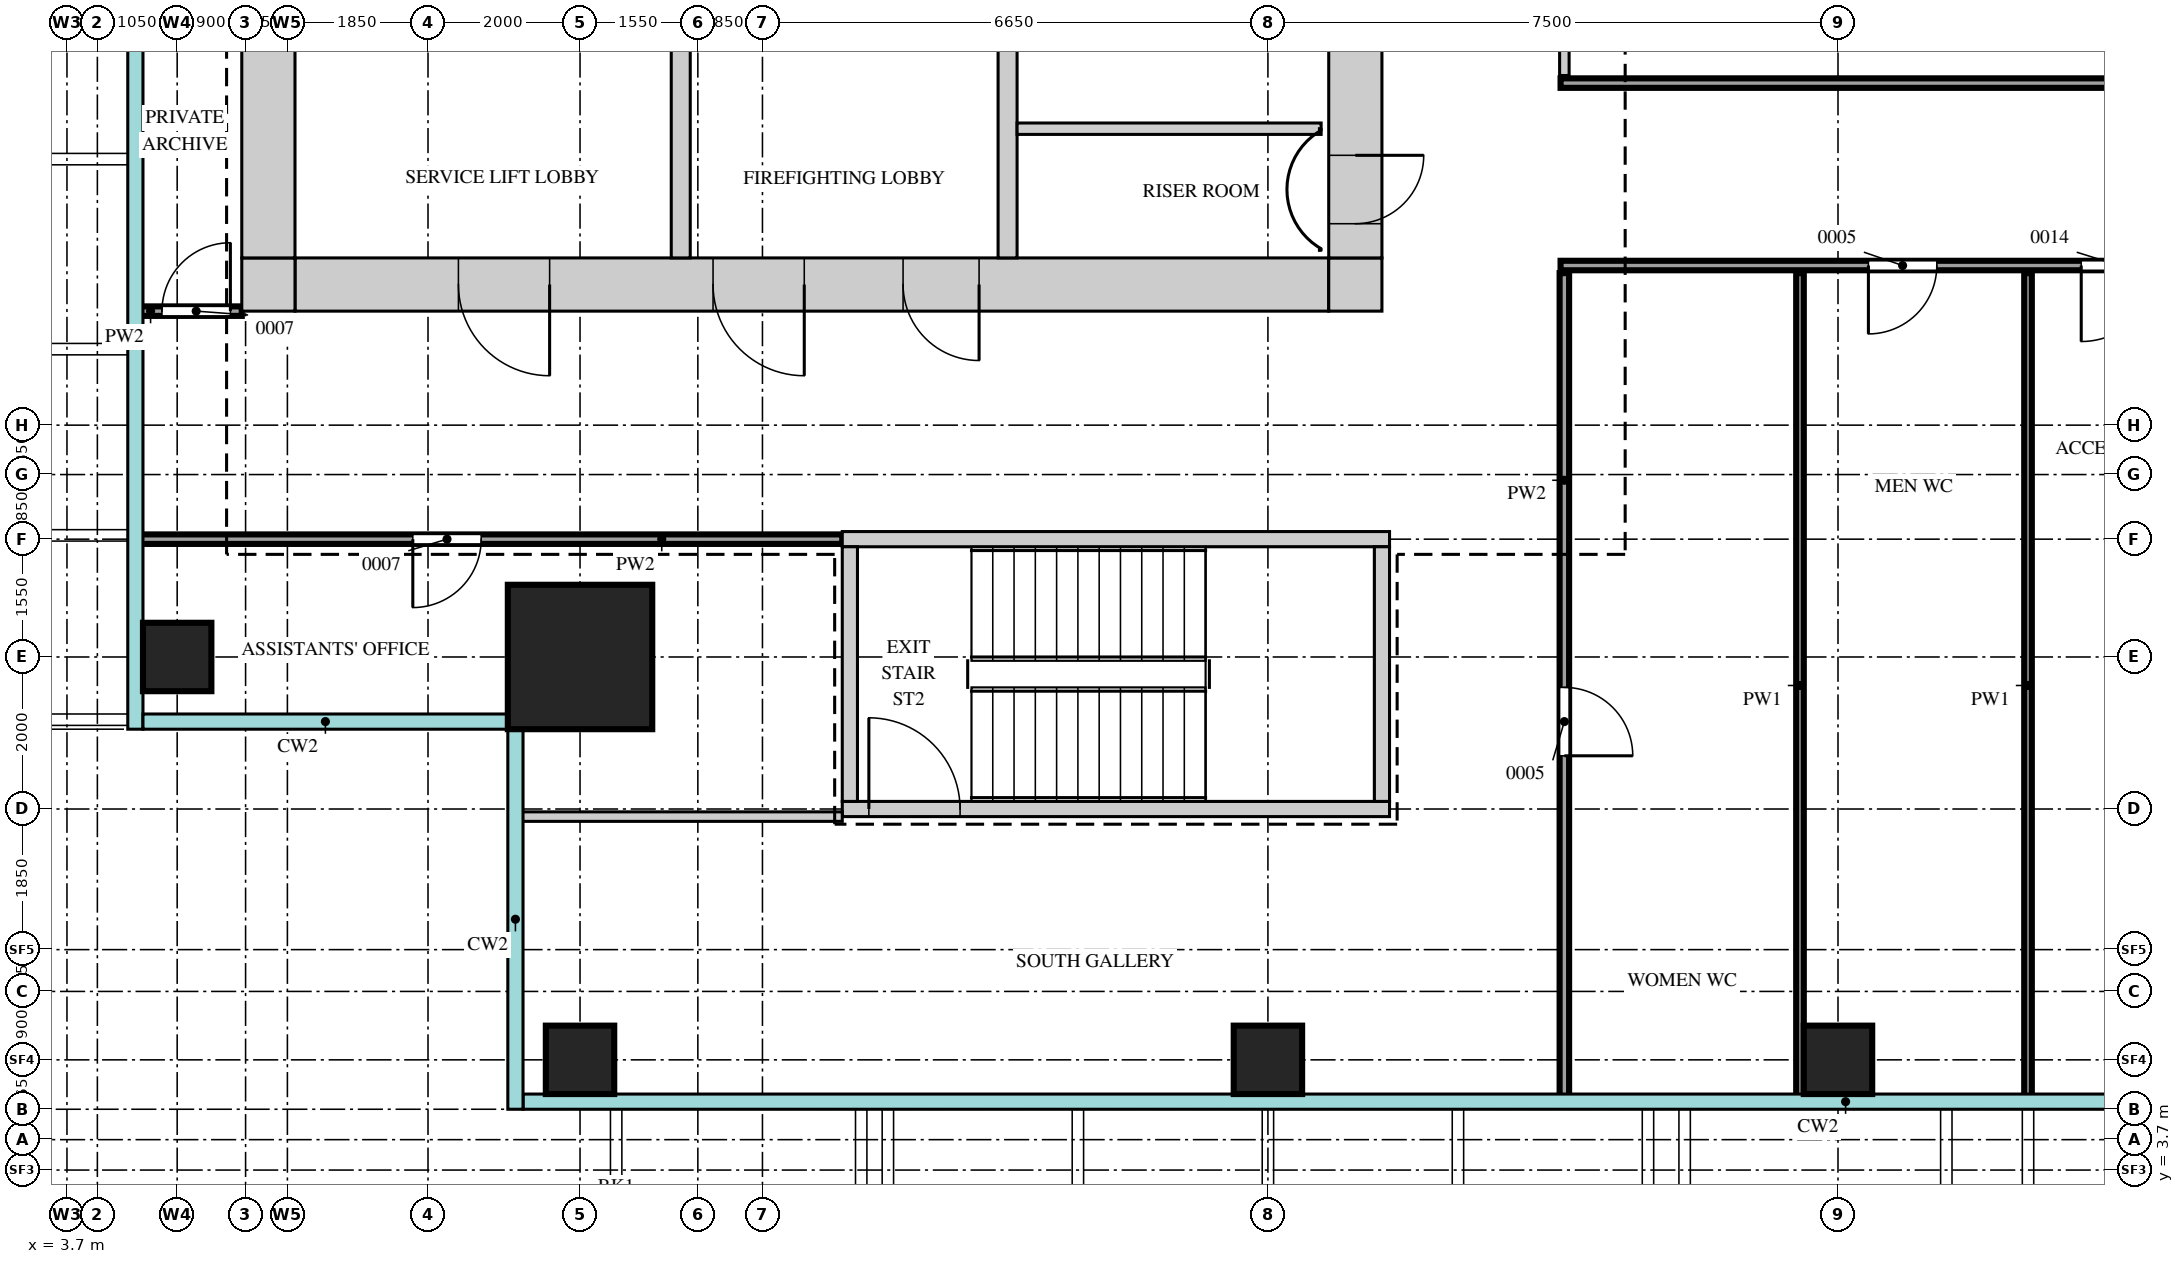
"""IFC4 building model, lengths in metres.
Left out: names, types, materials, properties, quantities, classifications, styles, units other than length and angle.
Written with IfcOpenShell. Run it as: python <this file> out.ifc"""

import sys

from ifc_helpers import new_model, si_unit, direction, frame, frame_2d, origin, origin_2d, place, context, subcontext, project, spatial, rectangle, extrude, source, transform, mapped, element, fill, save


model = new_model("IFC4")
c1 = context("Model", 3, precision=1e-05, world=origin(), true_north=direction((0.0, 1.0)))
c2 = subcontext(c1, "Body", "Model", "MODEL_VIEW")
j1 = project(units=[si_unit("LENGTHUNIT", "METRE"), si_unit("PLANEANGLEUNIT", "RADIAN")], contexts=[c1])
p1 = place(None, origin())
s1 = spatial("IfcSite", under=j1, at=p1, CompositionType="ELEMENT")
p2 = place(p1, origin())
s2 = spatial("IfcBuilding", under=s1, at=p2, CompositionType="ELEMENT")
p3 = place(p2, frame((0.0, 0.0, 266.2)))
s3 = spatial("IfcBuildingStorey", under=s2, at=p3, CompositionType="ELEMENT", Elevation=266.2)
m1 = source(origin(), c2, "Body", "SweptSolid", [
    extrude(rectangle(XDim=13.6, YDim=0.7, at=frame_2d((6.8, 0.0))), origin(), (0.0, 0.0, 1.0), 3.75),
])
p4 = place(p3, frame((6.7, 15.35, 0.0), z_axis=(0.0, 0.0, 1.0), x_axis=(1.0, 0.0, 0.0)))
e1 = element("IfcWall", 1, at=p4, inside=s3, PredefinedType="SHEAR", context=c2, shape_type="MappedRepresentation", body=[
    mapped(m1, transform((0.0, 0.0, 0.0))),
])
m2 = source(origin(), c2, "Body", "SweptSolid", [
    extrude(rectangle(XDim=1.2, YDim=2.1, at=frame_2d((0.6, 1.05))), frame((0.0, 0.36, 0.0), z_axis=(0.0, -1.0, 0.0), x_axis=(1.0, 0.0, 0.0)), (0.0, 0.0, 1.0), 0.72),
])
p5 = place(p4, frame((5.5, 0.0, 0.0)))
e2 = element("IfcOpeningElement", 2, at=p5, cuts=e1, PredefinedType="OPENING", context=c2, shape_type="MappedRepresentation", body=[
    mapped(m2, transform((0.0, 0.0, 0.0))),
])
p6 = place(p4, frame((2.15, 0.0, 0.0)))
e3 = element("IfcOpeningElement", 3, at=p6, cuts=e1, PredefinedType="OPENING", context=c2, shape_type="MappedRepresentation", body=[
    mapped(m2, transform((0.0, 0.0, 0.0))),
])
m3 = source(origin(), c2, "Body", "SweptSolid", [
    extrude(rectangle(XDim=1.0, YDim=2.1, at=frame_2d((0.5, 1.05))), frame((0.0, 0.36, 0.0), z_axis=(0.0, -1.0, 0.0), x_axis=(1.0, 0.0, 0.0)), (0.0, 0.0, 1.0), 0.72),
])
p7 = place(p4, frame((8.0, 0.0, 0.0)))
e4 = element("IfcOpeningElement", 4, at=p7, cuts=e1, PredefinedType="OPENING", context=c2, shape_type="MappedRepresentation", body=[
    mapped(m3, transform((0.0, 0.0, 0.0))),
])
m4 = source(origin(), c2, "Body", "SweptSolid", [
    extrude(rectangle(XDim=0.7, YDim=0.7, at=frame_2d((0.35, 0.0))), origin(), (0.0, 0.0, 1.0), 3.75),
])
for number, where, z_axis, x_axis in (
    (5, (20.3, 15.35, 0.0), (0.0, 0.0, 1.0), (1.0, 0.0, 0.0)),
    (6, (6.0, 15.35, 0.0), (0.0, 0.0, 1.0), (1.0, 0.0, 0.0)),
):
    element("IfcWall", number, at=place(p3, frame(where, z_axis=z_axis, x_axis=x_axis)), inside=s3, PredefinedType="SHEAR", context=c2, shape_type="MappedRepresentation", body=[
        mapped(m4, transform((0.0, 0.0, 0.0))),
    ])
m5 = source(origin(), c2, "Body", "SweptSolid", [
    extrude(rectangle(XDim=22.6, YDim=0.7, at=frame_2d((11.3, 0.0))), origin(), (0.0, 0.0, 1.0), 3.75),
])
p8 = place(p3, frame((20.65, 15.7, 0.0), z_axis=(0.0, 0.0, 1.0), x_axis=(0.0, 1.0, 0.0)))
e7 = element("IfcWall", 7, at=p8, inside=s3, PredefinedType="SHEAR", context=c2, shape_type="MappedRepresentation", body=[
    mapped(m5, transform((0.0, 0.0, 0.0))),
])
m6 = source(origin(), c2, "Body", "SweptSolid", [
    extrude(rectangle(XDim=1.8, YDim=2.1, at=frame_2d((0.9, 1.05))), frame((0.0, 0.36, 0.0), z_axis=(0.0, -1.0, 0.0), x_axis=(1.0, 0.0, 0.0)), (0.0, 0.0, 1.0), 0.72),
])
p9 = place(p8, frame((10.8, 0.0, 0.0)))
e8 = element("IfcOpeningElement", 8, at=p9, cuts=e7, PredefinedType="OPENING", context=c2, shape_type="MappedRepresentation", body=[
    mapped(m6, transform((0.0, 0.0, 0.0))),
])
m7 = source(origin(), c2, "Body", "SweptSolid", [
    extrude(rectangle(XDim=0.9, YDim=2.1, at=frame_2d((0.45, 1.05))), frame((0.0, 0.36, 0.0), z_axis=(0.0, -1.0, 0.0), x_axis=(1.0, 0.0, 0.0)), (0.0, 0.0, 1.0), 0.72),
])
p10 = place(p8, frame((0.45, 0.0, 0.0)))
e9 = element("IfcOpeningElement", 9, at=p10, cuts=e7, PredefinedType="OPENING", context=c2, shape_type="MappedRepresentation", body=[
    mapped(m7, transform((0.0, 0.0, 0.0))),
])
p11 = place(p8, frame((4.0, 0.0, 0.0)))
e10 = element("IfcOpeningElement", 10, at=p11, cuts=e7, PredefinedType="OPENING", context=c2, shape_type="MappedRepresentation", body=[
    mapped(m7, transform((0.0, 0.0, 0.0))),
])
p12 = place(p3, frame((6.35, 15.7, 0.0), z_axis=(0.0, 0.0, 1.0), x_axis=(0.0, 1.0, 0.0)))
e11 = element("IfcWall", 11, at=p12, inside=s3, PredefinedType="SHEAR", context=c2, shape_type="MappedRepresentation", body=[
    mapped(m5, transform((0.0, 0.0, 0.0))),
])
m8 = source(origin(), c2, "Body", "SweptSolid", [
    extrude(rectangle(XDim=7.2, YDim=0.2, at=frame_2d((3.6, 0.0))), origin(), (0.0, 0.0, 1.0), 3.75),
])
p13 = place(p3, frame((13.9, 12.0, 0.0), z_axis=(0.0, 0.0, 1.0), x_axis=(1.0, 0.0, 0.0)))
e12 = element("IfcWall", 12, at=p13, inside=s3, PredefinedType="SHEAR", context=c2, shape_type="MappedRepresentation", body=[
    mapped(m8, transform((0.0, 0.0, 0.0))),
])
p14 = place(p3, frame((13.9, 8.45, 0.0), z_axis=(0.0, 0.0, 1.0), x_axis=(1.0, 0.0, 0.0)))
e13 = element("IfcWall", 13, at=p14, inside=s3, PredefinedType="SHEAR", context=c2, shape_type="MappedRepresentation", body=[
    mapped(m8, transform((0.0, 0.0, 0.0))),
])
m9 = source(origin(), c2, "Body", "SweptSolid", [
    extrude(rectangle(XDim=1.2, YDim=2.1, at=frame_2d((0.6, 1.05))), frame((0.0, 0.11, 0.0), z_axis=(0.0, -1.0, 0.0), x_axis=(1.0, 0.0, 0.0)), (0.0, 0.0, 1.0), 0.22),
])
p15 = place(p14, frame((0.35, 0.0, 0.0)))
e14 = element("IfcOpeningElement", 14, at=p15, cuts=e13, PredefinedType="OPENING", context=c2, shape_type="MappedRepresentation", body=[
    mapped(m9, transform((0.0, 0.0, 0.0))),
])
m10 = source(origin(), c2, "Body", "SweptSolid", [
    extrude(rectangle(XDim=3.35, YDim=0.2, at=frame_2d((1.675, 0.0))), origin(), (0.0, 0.0, 1.0), 3.75),
])
for number, where, z_axis, x_axis in (
    (15, (21.0, 8.55, 0.0), (0.0, 0.0, 1.0), (0.0, 1.0, 0.0)),
    (16, (14.0, 8.55, 0.0), (0.0, 0.0, 1.0), (0.0, 1.0, 0.0)),
):
    element("IfcWall", number, at=place(p3, frame(where, z_axis=z_axis, x_axis=x_axis)), inside=s3, PredefinedType="SHEAR", context=c2, shape_type="MappedRepresentation", body=[
        mapped(m10, transform((0.0, 0.0, 0.0))),
    ])
m11 = source(origin(), c2, "Body", "SweptSolid", [
    extrude(rectangle(XDim=3.5, YDim=0.25, at=frame_2d((1.75, 0.0))), origin(), (0.0, 0.0, 1.0), 3.75),
])
for number, where, z_axis, x_axis in (
    (17, (16.075, 15.7, 0.0), (0.0, 0.0, 1.0), (0.0, 1.0, 0.0)),
    (18, (11.775, 15.7, 0.0), (0.0, 0.0, 1.0), (0.0, 1.0, 0.0)),
):
    element("IfcWall", number, at=place(p3, frame(where, z_axis=z_axis, x_axis=x_axis)), inside=s3, PredefinedType="STANDARD", context=c2, shape_type="MappedRepresentation", body=[
        mapped(m11, transform((0.0, 0.0, 0.0))),
    ])
m12 = source(origin(), c2, "Body", "SweptSolid", [
    extrude(rectangle(XDim=1.9, YDim=1.9, at=origin_2d()), origin(), (0.0, 0.0, 1.0), 4.0),
])
p16 = place(p3, frame((10.45, 10.45, 0.0), z_axis=(0.0, 0.0, 1.0), x_axis=(1.0, 0.0, 0.0)))
e19 = element("IfcColumn", 19, at=p16, inside=s3, PredefinedType="COLUMN", context=c2, shape_type="MappedRepresentation", body=[
    mapped(m12, transform((0.0, 0.0, 0.0))),
])
m13 = source(origin(), c2, "Body", "SweptSolid", [
    extrude(rectangle(XDim=0.9, YDim=0.9, at=origin_2d()), origin(), (0.0, 0.0, 1.0), 3.75),
])
for number, where, z_axis, x_axis in (
    (20, (10.45, 5.15, 0.0), (0.0, 0.0, 1.0), (1.0, 0.0, 0.0)),
    (21, (19.5, 5.15, 0.0), (0.0, 0.0, 1.0), (1.0, 0.0, 0.0)),
    (22, (27.0, 5.15, 0.0), (0.0, 0.0, 1.0), (1.0, 0.0, 0.0)),
    (23, (5.15, 10.45, 0.0), (0.0, 0.0, 1.0), (1.0, 0.0, 0.0)),
):
    element("IfcColumn", number, at=place(p3, frame(where, z_axis=z_axis, x_axis=x_axis)), inside=s3, PredefinedType="COLUMN", context=c2, shape_type="MappedRepresentation", body=[
        mapped(m13, transform((0.0, 0.0, 0.0))),
    ])
m14 = source(origin(), c2, "Body", "SweptSolid", [
    extrude(rectangle(XDim=10.85, YDim=0.125, at=frame_2d((5.425, 0.0))), origin(), (0.0, 0.0, 1.0), 3.8),
])
p17 = place(p3, frame((23.4, 4.65, 0.0), z_axis=(0.0, 0.0, 1.0), x_axis=(0.0, 1.0, 0.0)))
e24 = element("IfcWall", 24, at=p17, inside=s3, PredefinedType="PARTITIONING", context=c2, shape_type="MappedRepresentation", body=[
    mapped(m14, transform((0.0, 0.0, 0.0))),
])
m15 = source(origin(), c2, "Body", "SweptSolid", [
    extrude(rectangle(XDim=0.9, YDim=2.1, at=frame_2d((0.45, 1.05))), frame((0.0, 0.073, 0.0), z_axis=(0.0, -1.0, 0.0), x_axis=(1.0, 0.0, 0.0)), (0.0, 0.0, 1.0), 0.145),
])
p18 = place(p17, frame((4.5, 0.0, 0.0)))
e25 = element("IfcOpeningElement", 25, at=p18, cuts=e24, PredefinedType="OPENING", context=c2, shape_type="MappedRepresentation", body=[
    mapped(m15, transform((0.0, 0.0, 0.0))),
])
m16 = source(origin(), c2, "Body", "SweptSolid", [
    extrude(rectangle(XDim=10.85, YDim=0.1, at=frame_2d((5.425, 0.0))), origin(), (0.0, 0.0, 1.0), 3.8),
])
for number, where, z_axis, x_axis in (
    (26, (26.5, 4.65, 0.0), (0.0, 0.0, 1.0), (0.0, 1.0, 0.0)),
    (27, (29.5, 4.65, 0.0), (0.0, 0.0, 1.0), (0.0, 1.0, 0.0)),
):
    element("IfcWall", number, at=place(p3, frame(where, z_axis=z_axis, x_axis=x_axis)), inside=s3, PredefinedType="PARTITIONING", context=c2, shape_type="MappedRepresentation", body=[
        mapped(m16, transform((0.0, 0.0, 0.0))),
    ])
m17 = source(origin(), c2, "Body", "SweptSolid", [
    extrude(rectangle(XDim=4.25, YDim=0.125, at=frame_2d((2.125, 0.0))), origin(), (0.0, 0.0, 1.0), 3.8),
])
p19 = place(p3, frame((9.65, 8.35, 0.0), z_axis=(0.0, 0.0, 1.0), x_axis=(1.0, 0.0, 0.0)))
e28 = element("IfcWall", 28, at=p19, inside=s3, PredefinedType="PARTITIONING", context=c2, shape_type="MappedRepresentation", body=[
    mapped(m17, transform((0.0, 0.0, 0.0))),
])
m18 = source(origin(), c2, "Body", "SweptSolid", [
    extrude(rectangle(XDim=9.25, YDim=0.125, at=frame_2d((4.625, 0.0))), origin(), (0.0, 0.0, 1.0), 3.8),
])
p20 = place(p3, frame((4.65, 12.0, 0.0), z_axis=(0.0, 0.0, 1.0), x_axis=(1.0, 0.0, 0.0)))
e29 = element("IfcWall", 29, at=p20, inside=s3, PredefinedType="PARTITIONING", context=c2, shape_type="MappedRepresentation", body=[
    mapped(m18, transform((0.0, 0.0, 0.0))),
])
p21 = place(p20, frame((3.6, 0.0, 0.0)))
e30 = element("IfcOpeningElement", 30, at=p21, cuts=e29, PredefinedType="OPENING", context=c2, shape_type="MappedRepresentation", body=[
    mapped(m15, transform((0.0, 0.0, 0.0))),
])
m19 = source(origin(), c2, "Body", "SweptSolid", [
    extrude(rectangle(XDim=1.35, YDim=0.125, at=frame_2d((0.675, 0.0))), origin(), (0.0, 0.0, 1.0), 3.8),
])
p22 = place(p3, frame((4.65, 15.0, 0.0), z_axis=(0.0, 0.0, 1.0), x_axis=(1.0, 0.0, 0.0)))
e31 = element("IfcWall", 31, at=p22, inside=s3, PredefinedType="PARTITIONING", context=c2, shape_type="MappedRepresentation", body=[
    mapped(m19, transform((0.0, 0.0, 0.0))),
])
p23 = place(p22, frame((0.3, 0.0, 0.0)))
e32 = element("IfcOpeningElement", 32, at=p23, cuts=e31, PredefinedType="OPENING", context=c2, shape_type="MappedRepresentation", body=[
    mapped(m15, transform((0.0, 0.0, 0.0))),
])
m20 = source(origin(), c2, "Body", "SweptSolid", [
    extrude(rectangle(XDim=26.0, YDim=0.125, at=frame_2d((13.0, 0.0))), origin(), (0.0, 0.0, 1.0), 3.8),
])
p24 = place(p3, frame((23.35, 15.6, 0.0), z_axis=(0.0, 0.0, 1.0), x_axis=(1.0, 0.0, 0.0)))
e33 = element("IfcWall", 33, at=p24, inside=s3, PredefinedType="PARTITIONING", context=c2, shape_type="MappedRepresentation", body=[
    mapped(m20, transform((0.0, 0.0, 0.0))),
])
p25 = place(p24, frame((4.05, 0.0, 0.0)))
e34 = element("IfcOpeningElement", 34, at=p25, cuts=e33, PredefinedType="OPENING", context=c2, shape_type="MappedRepresentation", body=[
    mapped(m15, transform((0.0, 0.0, 0.0))),
])
m21 = source(origin(), c2, "Body", "SweptSolid", [
    extrude(rectangle(XDim=1.0, YDim=2.1, at=frame_2d((0.5, 1.05))), frame((0.0, 0.073, 0.0), z_axis=(0.0, -1.0, 0.0), x_axis=(1.0, 0.0, 0.0)), (0.0, 0.0, 1.0), 0.145),
])
p26 = place(p24, frame((6.85, 0.0, 0.0)))
e35 = element("IfcOpeningElement", 35, at=p26, cuts=e33, PredefinedType="OPENING", context=c2, shape_type="MappedRepresentation", body=[
    mapped(m21, transform((0.0, 0.0, 0.0))),
])
p27 = place(p24, frame((12.3, 0.0, 0.0)))
e36 = element("IfcOpeningElement", 36, at=p27, cuts=e33, PredefinedType="OPENING", context=c2, shape_type="MappedRepresentation", body=[
    mapped(m15, transform((0.0, 0.0, 0.0))),
])
m22 = source(origin(), c2, "Body", "SweptSolid", [
    extrude(rectangle(XDim=1.2, YDim=2.1, at=frame_2d((0.6, 1.05))), frame((0.0, 0.073, 0.0), z_axis=(0.0, -1.0, 0.0), x_axis=(1.0, 0.0, 0.0)), (0.0, 0.0, 1.0), 0.145),
])
p28 = place(p24, frame((20.8, 0.0, 0.0)))
e37 = element("IfcOpeningElement", 37, at=p28, cuts=e33, PredefinedType="OPENING", context=c2, shape_type="MappedRepresentation", body=[
    mapped(m22, transform((0.0, 0.0, 0.0))),
])
m23 = source(origin(), c2, "Body", "SweptSolid", [
    extrude(rectangle(XDim=4.0, YDim=0.15, at=frame_2d((2.0, 0.0))), origin(), (0.0, 0.0, 1.0), 3.8),
])
p29 = place(p3, frame((16.2, 17.4, 0.0), z_axis=(0.0, 0.0, 1.0), x_axis=(1.0, 0.0, 0.0)))
e38 = element("IfcWall", 38, at=p29, inside=s3, PredefinedType="PARTITIONING", context=c2, shape_type="MappedRepresentation", body=[
    mapped(m23, transform((0.0, 0.0, 0.0))),
])
p30 = place(p3, frame((23.35, 18.0, 0.0), z_axis=(0.0, 0.0, 1.0), x_axis=(1.0, 0.0, 0.0)))
e39 = element("IfcWall", 39, at=p30, inside=s3, PredefinedType="PARTITIONING", context=c2, shape_type="MappedRepresentation", body=[
    mapped(m20, transform((0.0, 0.0, 0.0))),
])
p31 = place(p30, frame((19.55, 0.0, 0.0)))
e40 = element("IfcOpeningElement", 40, at=p31, cuts=e39, PredefinedType="OPENING", context=c2, shape_type="MappedRepresentation", body=[
    mapped(m22, transform((0.0, 0.0, 0.0))),
])
m24 = source(origin(), c2, "Body", "SweptSolid", [
    extrude(rectangle(XDim=18.4, YDim=0.125, at=frame_2d((9.2, 0.0))), origin(), (0.0, 0.0, 1.0), 3.8),
])
p32 = place(p3, frame((23.4, 18.1, 0.0), z_axis=(0.0, 0.0, 1.0), x_axis=(0.0, 1.0, 0.0)))
e41 = element("IfcWall", 41, at=p32, inside=s3, PredefinedType="PARTITIONING", context=c2, shape_type="MappedRepresentation", body=[
    mapped(m24, transform((0.0, 0.0, 0.0))),
])
p33 = place(p32, frame((8.6, 0.0, 0.0)))
e42 = element("IfcOpeningElement", 42, at=p33, cuts=e41, PredefinedType="OPENING", context=c2, shape_type="MappedRepresentation", body=[
    mapped(m22, transform((0.0, 0.0, 0.0))),
])
m25 = source(origin(), c2, "Body", "SweptSolid", [
    extrude(rectangle(XDim=0.9, YDim=2.1, at=frame_2d((0.45, 1.05))), frame((0.0, 0.3, 0.0), z_axis=(0.0, -1.0, 0.0), x_axis=(1.0, 0.0, 0.0)), (0.0, 0.0, 1.0), 0.6),
])
p34 = place(p10, origin())
e43 = element("IfcDoor", 43, at=p34, inside=s3, OperationType="SINGLE_SWING_RIGHT", PredefinedType="DOOR", context=c2, shape_type="MappedRepresentation", body=[
    mapped(m25, transform((0.0, 0.0, 0.0))),
])
fill(e9, e43)
m26 = source(origin(), c2, "Body", "SweptSolid", [
    extrude(rectangle(XDim=1.2, YDim=2.1, at=frame_2d((0.6, 1.05))), frame((0.0, 0.3, 0.0), z_axis=(0.0, -1.0, 0.0), x_axis=(1.0, 0.0, 0.0)), (0.0, 0.0, 1.0), 0.6),
])
p35 = place(p5, origin())
e44 = element("IfcDoor", 44, at=p35, inside=s3, OperationType="SINGLE_SWING_RIGHT", PredefinedType="DOOR", context=c2, shape_type="MappedRepresentation", body=[
    mapped(m26, transform((0.0, 0.0, 0.0))),
])
fill(e2, e44)
p36 = place(p6, origin())
e45 = element("IfcDoor", 45, at=p36, inside=s3, OperationType="SINGLE_SWING_RIGHT", PredefinedType="DOOR", context=c2, shape_type="MappedRepresentation", body=[
    mapped(m26, transform((0.0, 0.0, 0.0))),
])
fill(e3, e45)
m27 = source(origin(), c2, "Body", "SweptSolid", [
    extrude(rectangle(XDim=1.0, YDim=2.1, at=frame_2d((0.5, 1.05))), frame((0.0, 0.3, 0.0), z_axis=(0.0, -1.0, 0.0), x_axis=(1.0, 0.0, 0.0)), (0.0, 0.0, 1.0), 0.6),
])
p37 = place(p7, origin())
e46 = element("IfcDoor", 46, at=p37, inside=s3, OperationType="SINGLE_SWING_RIGHT", PredefinedType="DOOR", context=c2, shape_type="MappedRepresentation", body=[
    mapped(m27, transform((0.0, 0.0, 0.0))),
])
fill(e4, e46)
m28 = source(origin(), c2, "Body", "SweptSolid", [
    extrude(rectangle(XDim=0.9, YDim=2.1, at=frame_2d((0.45, 1.05))), frame((0.0, 0.025, 0.0), z_axis=(0.0, -1.0, 0.0), x_axis=(1.0, 0.0, 0.0)), (0.0, 0.0, 1.0), 0.05),
])
p38 = place(p23, origin())
e47 = element("IfcDoor", 47, at=p38, inside=s3, OperationType="SINGLE_SWING_LEFT", PredefinedType="DOOR", context=c2, shape_type="MappedRepresentation", body=[
    mapped(m28, transform((0.0, 0.0, 0.0))),
])
fill(e32, e47)
p39 = place(p21, origin())
e48 = element("IfcDoor", 48, at=p39, inside=s3, OperationType="SINGLE_SWING_LEFT", PredefinedType="DOOR", context=c2, shape_type="MappedRepresentation", body=[
    mapped(m28, transform((0.0, 0.0, 0.0))),
])
fill(e30, e48)
p40 = place(p18, origin())
e49 = element("IfcDoor", 49, at=p40, inside=s3, OperationType="SINGLE_SWING_LEFT", PredefinedType="DOOR", context=c2, shape_type="MappedRepresentation", body=[
    mapped(m28, transform((0.0, 0.0, 0.0))),
])
fill(e25, e49)
p41 = place(p25, origin())
e50 = element("IfcDoor", 50, at=p41, inside=s3, OperationType="SINGLE_SWING_LEFT", PredefinedType="DOOR", context=c2, shape_type="MappedRepresentation", body=[
    mapped(m28, transform((0.0, 0.0, 0.0))),
])
fill(e34, e50)
m29 = source(origin(), c2, "Body", "SweptSolid", [
    extrude(rectangle(XDim=1.0, YDim=2.1, at=frame_2d((0.5, 1.05))), frame((0.0, 0.025, 0.0), z_axis=(0.0, -1.0, 0.0), x_axis=(1.0, 0.0, 0.0)), (0.0, 0.0, 1.0), 0.05),
])
p42 = place(p26, origin())
e51 = element("IfcDoor", 51, at=p42, inside=s3, OperationType="SINGLE_SWING_LEFT", PredefinedType="DOOR", context=c2, shape_type="MappedRepresentation", body=[
    mapped(m29, transform((0.0, 0.0, 0.0))),
])
fill(e35, e51)
m30 = source(origin(), c2, "Body", "SweptSolid", [
    extrude(rectangle(XDim=1.2, YDim=2.1, at=frame_2d((0.6, 1.05))), frame((0.0, 0.025, 0.0), z_axis=(0.0, -1.0, 0.0), x_axis=(1.0, 0.0, 0.0)), (0.0, 0.0, 1.0), 0.05),
])
p43 = place(p15, origin())
e52 = element("IfcDoor", 52, at=p43, inside=s3, OperationType="SINGLE_SWING_RIGHT", PredefinedType="DOOR", context=c2, shape_type="MappedRepresentation", body=[
    mapped(m30, transform((0.0, 0.0, 0.0))),
])
fill(e14, e52)
save(model, sys.argv[1])
